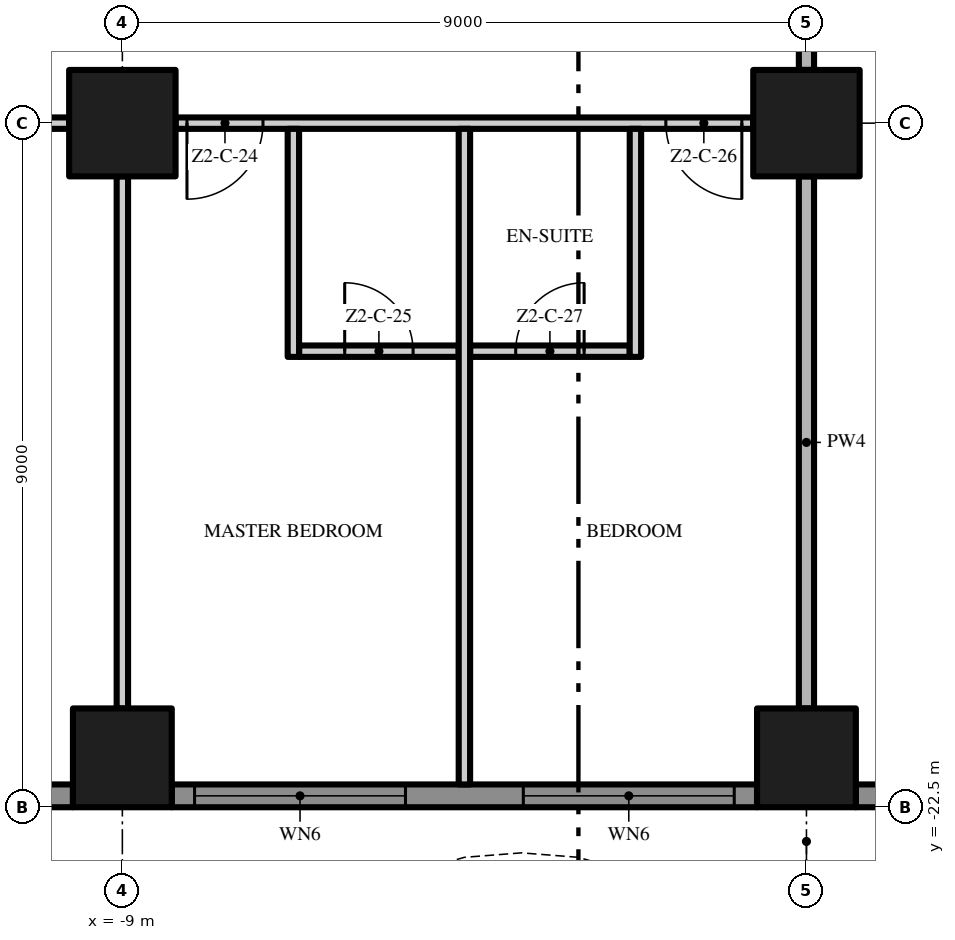
"""IFC4 building model, lengths in metres.
Left out: names, types, materials, properties, quantities, classifications, styles, units other than length and angle.
Written with IfcOpenShell. Run it as: python <this file> out.ifc"""

import sys

from ifc_helpers import new_model, si_unit, direction, frame, frame_2d, origin, origin_2d, place, context, subcontext, project, spatial, polyline, rectangle, outline, extrude, element, fill, save


model = new_model("IFC4")
c1 = context("Model", 3, precision=1e-05, world=origin(), true_north=direction((0.0, 1.0)))
c2 = subcontext(c1, "Body", "Model", "MODEL_VIEW")
j1 = project(units=[si_unit("LENGTHUNIT", "METRE"), si_unit("PLANEANGLEUNIT", "RADIAN")], contexts=[c1])
p1 = place(None, origin())
s1 = spatial("IfcSite", under=j1, at=p1, CompositionType="ELEMENT")
p2 = place(p1, origin())
s2 = spatial("IfcBuilding", under=s1, at=p2, CompositionType="ELEMENT")
p3 = place(p2, frame((0.0, 0.0, 92.2)))
s3 = spatial("IfcBuildingStorey", under=s2, at=p3, CompositionType="ELEMENT", Elevation=92.2)
p4 = place(p3, frame((-9.0, -13.5, 0.0), z_axis=(0.0, 0.0, 1.0), x_axis=(1.0, 0.0, 0.0)))
e1 = element("IfcColumn", 1, at=p4, inside=s3, PredefinedType="COLUMN", context=c2, shape_type="SweptSolid", body=[
    extrude(rectangle(XDim=1.4, YDim=1.4, at=origin_2d()), origin(), (0.0, 0.0, 1.0), 3.5),
])
p5 = place(p3, frame((-9.0, -21.85, 0.0), z_axis=(0.0, 0.0, 1.0), x_axis=(1.0, 0.0, 0.0)))
e2 = element("IfcColumn", 2, at=p5, inside=s3, PredefinedType="COLUMN", context=c2, shape_type="SweptSolid", body=[
    extrude(rectangle(XDim=1.3, YDim=1.3, at=origin_2d()), origin(), (0.0, 0.0, 1.0), 3.5),
])
p6 = place(p3, frame((0.0, -13.5, 0.0), z_axis=(0.0, 0.0, 1.0), x_axis=(1.0, 0.0, 0.0)))
e3 = element("IfcColumn", 3, at=p6, inside=s3, PredefinedType="COLUMN", context=c2, shape_type="SweptSolid", body=[
    extrude(rectangle(XDim=1.4, YDim=1.4, at=origin_2d()), origin(), (0.0, 0.0, 1.0), 3.5),
])
p7 = place(p3, frame((0.0, -21.85, 0.0), z_axis=(0.0, 0.0, 1.0), x_axis=(1.0, 0.0, 0.0)))
e4 = element("IfcColumn", 4, at=p7, inside=s3, PredefinedType="COLUMN", context=c2, shape_type="SweptSolid", body=[
    extrude(rectangle(XDim=1.3, YDim=1.3, at=origin_2d()), origin(), (0.0, 0.0, 1.0), 3.5),
])
p8 = place(p3, frame((-9.65, -22.35, 0.0), z_axis=(0.0, 0.0, 1.0), x_axis=(-1.0, 0.0, 0.0)))
e5 = element("IfcWall", 5, at=p8, inside=s3, PredefinedType="SOLIDWALL", context=c2, shape_type="SweptSolid", body=[
    extrude(rectangle(XDim=7.7, YDim=0.3, at=frame_2d((3.85, 0.0))), origin(), (0.0, 0.0, 1.0), 3.5),
])
p9 = place(p8, frame((4.625, 0.0, 0.45)))
e6 = element("IfcOpeningElement", 6, at=p9, cuts=e5, PredefinedType="OPENING", context=c2, shape_type="SweptSolid", body=[
    extrude(rectangle(XDim=2.775, YDim=2.65, at=frame_2d((1.387, 1.325))), frame((0.0, 0.16, 0.0), z_axis=(0.0, -1.0, 0.0), x_axis=(1.0, 0.0, 0.0)), (0.0, 0.0, 1.0), 0.32),
])
p10 = place(p8, frame((0.3, 0.0, 0.0)))
e7 = element("IfcOpeningElement", 7, at=p10, cuts=e5, PredefinedType="OPENING", context=c2, shape_type="SweptSolid", body=[
    extrude(rectangle(XDim=2.775, YDim=2.4, at=frame_2d((1.387, 1.2))), frame((0.0, 0.16, 0.0), z_axis=(0.0, -1.0, 0.0), x_axis=(1.0, 0.0, 0.0)), (0.0, 0.0, 1.0), 0.32),
])
p11 = place(p3, frame((-0.65, -22.35, 0.0), z_axis=(0.0, 0.0, 1.0), x_axis=(-1.0, 0.0, 0.0)))
e8 = element("IfcWall", 8, at=p11, inside=s3, PredefinedType="SOLIDWALL", context=c2, shape_type="SweptSolid", body=[
    extrude(rectangle(XDim=7.7, YDim=0.3, at=frame_2d((3.85, 0.0))), origin(), (0.0, 0.0, 1.0), 3.5),
])
p12 = place(p11, frame((4.625, 0.0, 0.45)))
e9 = element("IfcOpeningElement", 9, at=p12, cuts=e8, PredefinedType="OPENING", context=c2, shape_type="SweptSolid", body=[
    extrude(rectangle(XDim=2.775, YDim=2.65, at=frame_2d((1.387, 1.325))), frame((0.0, 0.16, 0.0), z_axis=(0.0, -1.0, 0.0), x_axis=(1.0, 0.0, 0.0)), (0.0, 0.0, 1.0), 0.32),
])
p13 = place(p11, frame((0.3, 0.0, 0.45)))
e10 = element("IfcOpeningElement", 10, at=p13, cuts=e8, PredefinedType="OPENING", context=c2, shape_type="SweptSolid", body=[
    extrude(rectangle(XDim=2.775, YDim=2.65, at=frame_2d((1.387, 1.325))), frame((0.0, 0.16, 0.0), z_axis=(0.0, -1.0, 0.0), x_axis=(1.0, 0.0, 0.0)), (0.0, 0.0, 1.0), 0.32),
])
p14 = place(p3, frame((8.35, -22.35, 0.0), z_axis=(0.0, 0.0, 1.0), x_axis=(-1.0, 0.0, 0.0)))
e11 = element("IfcWall", 11, at=p14, inside=s3, PredefinedType="SOLIDWALL", context=c2, shape_type="SweptSolid", body=[
    extrude(rectangle(XDim=7.7, YDim=0.3, at=frame_2d((3.85, 0.0))), origin(), (0.0, 0.0, 1.0), 3.5),
])
p15 = place(p14, frame((4.625, 0.0, 0.0)))
e12 = element("IfcOpeningElement", 12, at=p15, cuts=e11, PredefinedType="OPENING", context=c2, shape_type="SweptSolid", body=[
    extrude(rectangle(XDim=2.775, YDim=2.4, at=frame_2d((1.387, 1.2))), frame((0.0, 0.16, 0.0), z_axis=(0.0, -1.0, 0.0), x_axis=(1.0, 0.0, 0.0)), (0.0, 0.0, 1.0), 0.32),
])
p16 = place(p14, frame((0.3, 0.0, 0.45)))
e13 = element("IfcOpeningElement", 13, at=p16, cuts=e11, PredefinedType="OPENING", context=c2, shape_type="SweptSolid", body=[
    extrude(rectangle(XDim=2.775, YDim=2.65, at=frame_2d((1.387, 1.325))), frame((0.0, 0.16, 0.0), z_axis=(0.0, -1.0, 0.0), x_axis=(1.0, 0.0, 0.0)), (0.0, 0.0, 1.0), 0.32),
])
p17 = place(p3, origin())
e14 = element("IfcWall", 14, at=p17, inside=s3, PredefinedType="USERDEFINED", context=c2, shape_type="SweptSolid", body=[
    extrude(outline(polyline([(-22.5, -24.3), (-21.0, -23.595), (-19.5, -23.159), (-18.75, -23.1), (-18.0, -23.159), (-16.5, -23.595), (-15.0, -24.3), (-13.5, -25.005), (-12.0, -25.441), (-11.25, -25.5), (-10.5, -25.441), (-9.0, -25.005), (-7.5, -24.3), (-6.0, -23.595), (-4.5, -23.159), (-3.75, -23.1), (-3.0, -23.159), (-1.5, -23.595), (0.0, -24.3), (1.5, -25.005), (3.0, -25.441), (3.75, -25.5), (4.5, -25.441), (6.0, -25.005), (7.5, -24.3), (9.0, -23.595), (10.5, -23.159), (11.25, -23.1), (12.0, -23.159), (13.5, -23.595), (15.0, -24.3), (16.5, -25.005), (18.0, -25.441), (18.75, -25.5), (19.5, -25.441), (21.0, -25.005), (22.5, -24.3), (22.394, -24.074), (20.911, -24.771), (19.455, -25.194), (18.75, -25.249), (18.045, -25.194), (16.589, -24.771), (15.106, -24.074), (13.589, -23.36), (12.045, -22.911), (11.25, -22.849), (10.455, -22.911), (8.911, -23.36), (7.394, -24.074), (5.911, -24.771), (4.455, -25.194), (3.75, -25.249), (3.045, -25.194), (1.589, -24.771), (0.106, -24.074), (-1.411, -23.36), (-2.955, -22.911), (-3.75, -22.849), (-4.545, -22.911), (-6.089, -23.36), (-7.606, -24.074), (-9.089, -24.771), (-10.545, -25.194), (-11.25, -25.249), (-11.955, -25.194), (-13.411, -24.771), (-14.894, -24.074), (-16.411, -23.36), (-17.955, -22.911), (-18.75, -22.849), (-19.545, -22.911), (-21.089, -23.36), (-22.606, -24.074), (-22.5, -24.3)])), origin(), (0.0, 0.0, 1.0), 0.9),
])
p18 = place(p3, frame((-6.675, -16.5, 0.0), z_axis=(0.0, 0.0, 1.0), x_axis=(1.0, 0.0, 0.0)))
e15 = element("IfcWall", 15, at=p18, inside=s3, PredefinedType="PARTITIONING", context=c2, shape_type="SweptSolid", body=[
    extrude(rectangle(XDim=2.1, YDim=0.15, at=frame_2d((1.05, 0.0))), origin(), (0.0, 0.0, 1.0), 3.5),
])
p19 = place(p18, frame((0.6, 0.0, 0.0)))
e16 = element("IfcOpeningElement", 16, at=p19, cuts=e15, PredefinedType="OPENING", context=c2, shape_type="SweptSolid", body=[
    extrude(rectangle(XDim=0.9, YDim=2.1, at=frame_2d((0.45, 1.05))), frame((0.0, 0.085, 0.0), z_axis=(0.0, -1.0, 0.0), x_axis=(1.0, 0.0, 0.0)), (0.0, 0.0, 1.0), 0.17),
])
p20 = place(p3, frame((-4.425, -16.5, 0.0), z_axis=(0.0, 0.0, 1.0), x_axis=(1.0, 0.0, 0.0)))
e17 = element("IfcWall", 17, at=p20, inside=s3, PredefinedType="PARTITIONING", context=c2, shape_type="SweptSolid", body=[
    extrude(rectangle(XDim=2.1, YDim=0.15, at=frame_2d((1.05, 0.0))), origin(), (0.0, 0.0, 1.0), 3.5),
])
p21 = place(p20, frame((0.6, 0.0, 0.0)))
e18 = element("IfcOpeningElement", 18, at=p21, cuts=e17, PredefinedType="OPENING", context=c2, shape_type="SweptSolid", body=[
    extrude(rectangle(XDim=0.9, YDim=2.1, at=frame_2d((0.45, 1.05))), frame((0.0, 0.085, 0.0), z_axis=(0.0, -1.0, 0.0), x_axis=(1.0, 0.0, 0.0)), (0.0, 0.0, 1.0), 0.17),
])
p22 = place(p3, frame((-9.7, -13.5, 0.0), z_axis=(0.0, 0.0, 1.0), x_axis=(-1.0, 0.0, 0.0)))
e19 = element("IfcWall", 19, at=p22, inside=s3, PredefinedType="PARTITIONING", context=c2, shape_type="SweptSolid", body=[
    extrude(rectangle(XDim=7.6, YDim=0.15, at=frame_2d((3.8, 0.0))), origin(), (0.0, 0.0, 1.0), 3.5),
])
p23 = place(p22, frame((4.0, 0.0, 0.0)))
e20 = element("IfcOpeningElement", 20, at=p23, cuts=e19, PredefinedType="OPENING", context=c2, shape_type="SweptSolid", body=[
    extrude(rectangle(XDim=1.8, YDim=2.4, at=frame_2d((0.9, 1.2))), frame((0.0, 0.085, 0.0), z_axis=(0.0, -1.0, 0.0), x_axis=(1.0, 0.0, 0.0)), (0.0, 0.0, 1.0), 0.17),
])
p24 = place(p3, frame((-0.7, -13.5, 0.0), z_axis=(0.0, 0.0, 1.0), x_axis=(-1.0, 0.0, 0.0)))
e21 = element("IfcWall", 21, at=p24, inside=s3, PredefinedType="PARTITIONING", context=c2, shape_type="SweptSolid", body=[
    extrude(rectangle(XDim=7.6, YDim=0.15, at=frame_2d((3.8, 0.0))), origin(), (0.0, 0.0, 1.0), 3.5),
])
p25 = place(p24, frame((6.45, 0.0, 0.0)))
e22 = element("IfcOpeningElement", 22, at=p25, cuts=e21, PredefinedType="OPENING", context=c2, shape_type="SweptSolid", body=[
    extrude(rectangle(XDim=1.0, YDim=2.4, at=frame_2d((0.5, 1.2))), frame((0.0, 0.085, 0.0), z_axis=(0.0, -1.0, 0.0), x_axis=(1.0, 0.0, 0.0)), (0.0, 0.0, 1.0), 0.17),
])
p26 = place(p24, frame((0.15, 0.0, 0.0)))
e23 = element("IfcOpeningElement", 23, at=p26, cuts=e21, PredefinedType="OPENING", context=c2, shape_type="SweptSolid", body=[
    extrude(rectangle(XDim=1.0, YDim=2.4, at=frame_2d((0.5, 1.2))), frame((0.0, 0.085, 0.0), z_axis=(0.0, -1.0, 0.0), x_axis=(1.0, 0.0, 0.0)), (0.0, 0.0, 1.0), 0.17),
])
p27 = place(p3, frame((-9.0, -21.2, 0.0), z_axis=(0.0, 0.0, 1.0), x_axis=(0.0, 1.0, 0.0)))
e24 = element("IfcWall", 24, at=p27, inside=s3, PredefinedType="PARTITIONING", context=c2, shape_type="SweptSolid", body=[
    extrude(rectangle(XDim=7.0, YDim=0.15, at=frame_2d((3.5, 0.0))), origin(), (0.0, 0.0, 1.0), 3.5),
])
p28 = place(p3, frame((-6.75, -16.575, 0.0), z_axis=(0.0, 0.0, 1.0), x_axis=(0.0, 1.0, 0.0)))
e25 = element("IfcWall", 25, at=p28, inside=s3, PredefinedType="PARTITIONING", context=c2, shape_type="SweptSolid", body=[
    extrude(rectangle(XDim=3.0, YDim=0.15, at=frame_2d((1.5, 0.0))), origin(), (0.0, 0.0, 1.0), 3.5),
])
p29 = place(p3, frame((-4.5, -22.2, 0.0), z_axis=(0.0, 0.0, 1.0), x_axis=(0.0, 1.0, 0.0)))
e26 = element("IfcWall", 26, at=p29, inside=s3, PredefinedType="PARTITIONING", context=c2, shape_type="SweptSolid", body=[
    extrude(rectangle(XDim=8.625, YDim=0.15, at=frame_2d((4.312, 0.0))), origin(), (0.0, 0.0, 1.0), 3.5),
])
p30 = place(p3, frame((-2.25, -16.575, 0.0), z_axis=(0.0, 0.0, 1.0), x_axis=(0.0, 1.0, 0.0)))
e27 = element("IfcWall", 27, at=p30, inside=s3, PredefinedType="PARTITIONING", context=c2, shape_type="SweptSolid", body=[
    extrude(rectangle(XDim=3.0, YDim=0.15, at=frame_2d((1.5, 0.0))), origin(), (0.0, 0.0, 1.0), 3.5),
])
p31 = place(p3, frame((0.0, -21.2, 0.0), z_axis=(0.0, 0.0, 1.0), x_axis=(0.0, 1.0, 0.0)))
e28 = element("IfcWall", 28, at=p31, inside=s3, PredefinedType="PARTITIONING", context=c2, shape_type="SweptSolid", body=[
    extrude(rectangle(XDim=7.0, YDim=0.2, at=frame_2d((3.5, 0.0))), origin(), (0.0, 0.0, 1.0), 3.5),
])
p32 = place(p3, frame((0.0, -12.8, 0.0), z_axis=(0.0, 0.0, 1.0), x_axis=(0.0, 1.0, 0.0)))
e29 = element("IfcWall", 29, at=p32, inside=s3, PredefinedType="PARTITIONING", context=c2, shape_type="SweptSolid", body=[
    extrude(rectangle(XDim=7.6, YDim=0.2, at=frame_2d((3.8, 0.0))), origin(), (0.0, 0.0, 1.0), 3.5),
])
p33 = place(p12, origin())
e30 = element("IfcWindow", 30, at=p33, inside=s3, PartitioningType="SINGLE_PANEL", PredefinedType="WINDOW", context=c2, shape_type="SweptSolid", body=[
    extrude(rectangle(XDim=2.775, YDim=2.65, at=frame_2d((1.387, 1.325))), frame((0.0, 0.03, 0.0), z_axis=(0.0, -1.0, 0.0), x_axis=(1.0, 0.0, 0.0)), (0.0, 0.0, 1.0), 0.06),
])
fill(e9, e30)
p34 = place(p13, origin())
e31 = element("IfcWindow", 31, at=p34, inside=s3, PartitioningType="SINGLE_PANEL", PredefinedType="WINDOW", context=c2, shape_type="SweptSolid", body=[
    extrude(rectangle(XDim=2.775, YDim=2.65, at=frame_2d((1.387, 1.325))), frame((0.0, 0.03, 0.0), z_axis=(0.0, -1.0, 0.0), x_axis=(1.0, 0.0, 0.0)), (0.0, 0.0, 1.0), 0.06),
])
fill(e10, e31)
p35 = place(p25, origin())
e32 = element("IfcDoor", 32, at=p35, inside=s3, OperationType="SINGLE_SWING_RIGHT", PredefinedType="DOOR", context=c2, shape_type="SweptSolid", body=[
    extrude(rectangle(XDim=1.0, YDim=2.4, at=frame_2d((0.5, 1.2))), frame((0.0, 0.025, 0.0), z_axis=(0.0, -1.0, 0.0), x_axis=(1.0, 0.0, 0.0)), (0.0, 0.0, 1.0), 0.05),
])
fill(e22, e32)
p36 = place(p19, origin())
e33 = element("IfcDoor", 33, at=p36, inside=s3, OperationType="SINGLE_SWING_LEFT", PredefinedType="DOOR", context=c2, shape_type="SweptSolid", body=[
    extrude(rectangle(XDim=0.9, YDim=2.1, at=frame_2d((0.45, 1.05))), frame((0.0, 0.025, 0.0), z_axis=(0.0, -1.0, 0.0), x_axis=(1.0, 0.0, 0.0)), (0.0, 0.0, 1.0), 0.05),
])
fill(e16, e33)
p37 = place(p26, origin())
e34 = element("IfcDoor", 34, at=p37, inside=s3, OperationType="SINGLE_SWING_LEFT", PredefinedType="DOOR", context=c2, shape_type="SweptSolid", body=[
    extrude(rectangle(XDim=1.0, YDim=2.4, at=frame_2d((0.5, 1.2))), frame((0.0, 0.025, 0.0), z_axis=(0.0, -1.0, 0.0), x_axis=(1.0, 0.0, 0.0)), (0.0, 0.0, 1.0), 0.05),
])
fill(e23, e34)
p38 = place(p21, origin())
e35 = element("IfcDoor", 35, at=p38, inside=s3, OperationType="SINGLE_SWING_RIGHT", PredefinedType="DOOR", context=c2, shape_type="SweptSolid", body=[
    extrude(rectangle(XDim=0.9, YDim=2.1, at=frame_2d((0.45, 1.05))), frame((0.0, 0.025, 0.0), z_axis=(0.0, -1.0, 0.0), x_axis=(1.0, 0.0, 0.0)), (0.0, 0.0, 1.0), 0.05),
])
fill(e18, e35)
save(model, sys.argv[1])
